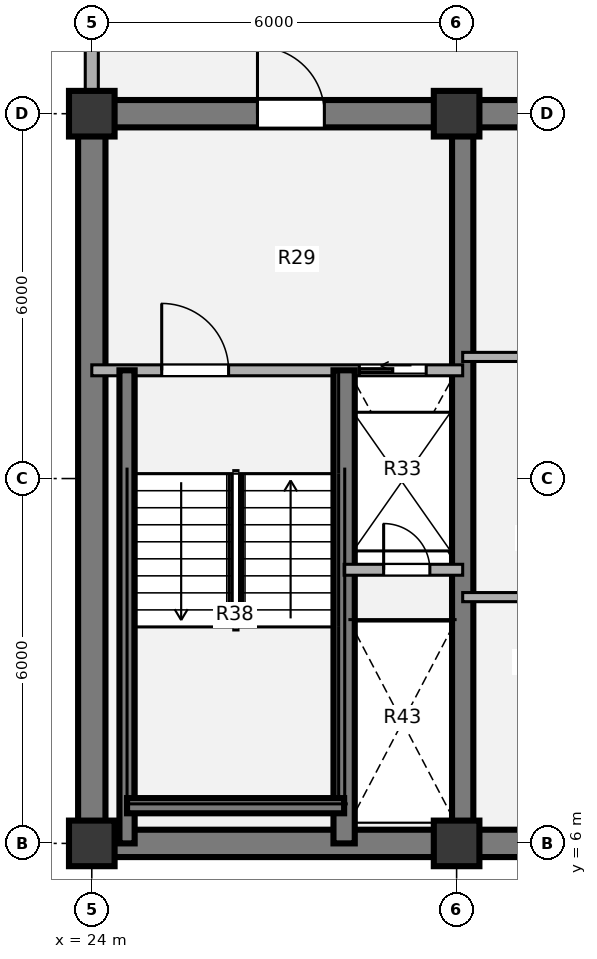
"""IFC4 building model, lengths in metres.
Left out: names, types, materials, properties, quantities, classifications, styles, units other than length and angle.
Written with IfcOpenShell. Run it as: python <this file> out.ifc"""

import sys

from ifc_helpers import new_model, si_unit, direction, frame, frame_2d, origin, origin_2d, place, context, subcontext, project, spatial, rectangle, extrude, source, transform, mapped, element, fill, save


model = new_model("IFC4")
c1 = context("Model", 3, precision=1e-05, world=origin(), true_north=direction((0.0, 1.0)))
c2 = subcontext(c1, "Body", "Model", "MODEL_VIEW")
j1 = project(units=[si_unit("LENGTHUNIT", "METRE"), si_unit("PLANEANGLEUNIT", "RADIAN")], contexts=[c1])
p1 = place(None, origin())
s1 = spatial("IfcSite", under=j1, at=p1, CompositionType="ELEMENT")
p2 = place(p1, origin())
s2 = spatial("IfcBuilding", under=s1, at=p2, CompositionType="ELEMENT")
p3 = place(p2, frame((0.0, 0.0, 163.98)))
s3 = spatial("IfcBuildingStorey", under=s2, at=p3, CompositionType="ELEMENT", Elevation=163.98)
m1 = source(origin(), c2, "Body", "SweptSolid", [
    extrude(rectangle(XDim=0.75, YDim=0.75, at=origin_2d()), origin(), (0.0, 0.0, 1.0), 3.78),
])
for number, where, z_axis, x_axis in (
    (1, (24.0, 6.0, 0.0), (0.0, 0.0, 1.0), (1.0, 0.0, 0.0)),
    (2, (30.0, 6.0, 0.0), (0.0, 0.0, 1.0), (1.0, 0.0, 0.0)),
    (3, (24.0, 18.0, 0.0), (0.0, 0.0, 1.0), (1.0, 0.0, 0.0)),
    (4, (30.0, 18.0, 0.0), (0.0, 0.0, 1.0), (1.0, 0.0, 0.0)),
):
    element("IfcColumn", number, at=place(p3, frame(where, z_axis=z_axis, x_axis=x_axis)), inside=s3, PredefinedType="COLUMN", context=c2, shape_type="MappedRepresentation", body=[
        mapped(m1, transform((0.0, 0.0, 0.0), x_axis=(1.0, 0.0, 0.0), y_axis=(0.0, 1.0, 0.0), z_axis=(0.0, 0.0, 1.0), scale=1.0)),
    ])
p4 = place(p3, frame((48.225, 6.0, 0.0), z_axis=(0.0, 0.0, 1.0), x_axis=(-1.0, 0.0, 0.0)))
e5 = element("IfcWall", 5, at=p4, inside=s3, PredefinedType="SHEAR", context=c2, shape_type="SweptSolid", body=[
    extrude(rectangle(XDim=24.45, YDim=0.45, at=frame_2d((12.225, 0.0))), origin(), (0.0, 0.0, 1.0), 3.78),
])
p5 = place(p3, frame((24.0, 6.0, 0.0), z_axis=(0.0, 0.0, 1.0), x_axis=(0.0, 1.0, 0.0)))
e6 = element("IfcWall", 6, at=p5, inside=s3, PredefinedType="SHEAR", context=c2, shape_type="SweptSolid", body=[
    extrude(rectangle(XDim=12.0, YDim=0.45, at=frame_2d((6.0, 0.0))), origin(), (0.0, 0.0, 1.0), 3.78),
])
p6 = place(p3, frame((23.775, 18.0, 0.0), z_axis=(0.0, 0.0, 1.0), x_axis=(1.0, 0.0, 0.0)))
e7 = element("IfcWall", 7, at=p6, inside=s3, PredefinedType="SHEAR", context=c2, shape_type="SweptSolid", body=[
    extrude(rectangle(XDim=9.425, YDim=0.45, at=frame_2d((4.712, 0.0))), origin(), (0.0, 0.0, 1.0), 3.78),
])
p7 = place(p6, frame((2.95, 0.0, 0.0)))
e8 = element("IfcOpeningElement", 8, at=p7, cuts=e7, PredefinedType="OPENING", context=c2, shape_type="SweptSolid", body=[
    extrude(rectangle(XDim=1.1, YDim=2.1, at=origin_2d()), frame((0.55, 0.235, 1.05), z_axis=(0.0, -1.0, 0.0), x_axis=(1.0, 0.0, 0.0)), (0.0, 0.0, 1.0), 0.47),
])
p8 = place(p3, frame((30.1, 6.0, 0.0), z_axis=(0.0, 0.0, 1.0), x_axis=(0.0, 1.0, 0.0)))
e9 = element("IfcWall", 9, at=p8, inside=s3, PredefinedType="SHEAR", context=c2, shape_type="SweptSolid", body=[
    extrude(rectangle(XDim=12.0, YDim=0.35, at=frame_2d((6.0, 0.0))), origin(), (0.0, 0.0, 1.0), 3.78),
])
p9 = place(p3, frame((24.0, 18.355, 0.0), z_axis=(0.0, 0.0, 1.0), x_axis=(0.0, 1.0, 0.0)))
e10 = element("IfcWall", 10, at=p9, inside=s3, PredefinedType="SOLIDWALL", context=c2, shape_type="SweptSolid", body=[
    extrude(rectangle(XDim=2.695, YDim=0.215, at=frame_2d((1.348, 0.0))), origin(), (0.0, 0.0, 1.0), 2.718),
])
for number, where, z_axis, x_axis in (
    (11, (30.1, 14.0, 0.0), (0.0, 0.0, 1.0), (1.0, 0.0, 0.0)),
    (12, (30.1, 10.05, 0.0), (0.0, 0.0, 1.0), (1.0, 0.0, 0.0)),
):
    element("IfcWall", number, at=place(p3, frame(where, z_axis=z_axis, x_axis=x_axis)), inside=s3, PredefinedType="PARTITIONING", context=c2, shape_type="SweptSolid", body=[
        extrude(rectangle(XDim=2.5, YDim=0.15, at=frame_2d((1.25, 0.0))), origin(), (0.0, 0.0, 1.0), 3.5),
    ])
p10 = place(p3, frame((24.0, 13.78, 0.0), z_axis=(0.0, 0.0, 1.0), x_axis=(1.0, 0.0, 0.0)))
e13 = element("IfcWall", 13, at=p10, inside=s3, PredefinedType="PARTITIONING", context=c2, shape_type="SweptSolid", body=[
    extrude(rectangle(XDim=6.1, YDim=0.18, at=frame_2d((3.05, 0.0))), origin(), (0.0, 0.0, 1.0), 3.5),
])
p11 = place(p10, frame((1.15, 0.0, 0.0)))
e14 = element("IfcOpeningElement", 14, at=p11, cuts=e13, PredefinedType="OPENING", context=c2, shape_type="SweptSolid", body=[
    extrude(rectangle(XDim=1.1, YDim=2.1, at=origin_2d()), frame((0.55, 0.1, 1.05), z_axis=(0.0, -1.0, 0.0), x_axis=(1.0, 0.0, 0.0)), (0.0, 0.0, 1.0), 0.2),
])
p12 = place(p10, frame((4.4, 0.0, 0.0)))
e15 = element("IfcOpeningElement", 15, at=p12, cuts=e13, PredefinedType="OPENING", context=c2, shape_type="SweptSolid", body=[
    extrude(rectangle(XDim=1.1, YDim=2.1, at=origin_2d()), frame((0.55, 0.1, 1.05), z_axis=(0.0, -1.0, 0.0), x_axis=(1.0, 0.0, 0.0)), (0.0, 0.0, 1.0), 0.2),
])
p13 = place(p3, frame((28.15, 6.0, 0.0), z_axis=(0.0, 0.0, 1.0), x_axis=(0.0, 1.0, 0.0)))
e16 = element("IfcWall", 16, at=p13, inside=s3, PredefinedType="SHEAR", context=c2, shape_type="SweptSolid", body=[
    extrude(rectangle(XDim=7.78, YDim=0.35, at=frame_2d((3.89, 0.0))), origin(), (0.0, 0.0, 1.0), 3.85),
])
p14 = place(p3, frame((24.58, 6.0, 0.0), z_axis=(0.0, 0.0, 1.0), x_axis=(0.0, 1.0, 0.0)))
e17 = element("IfcWall", 17, at=p14, inside=s3, PredefinedType="SHEAR", context=c2, shape_type="SweptSolid", body=[
    extrude(rectangle(XDim=7.78, YDim=0.25, at=frame_2d((3.89, 0.0))), origin(), (0.0, 0.0, 1.0), 3.85),
])
p15 = place(p3, frame((24.58, 6.62, 0.0), z_axis=(0.0, 0.0, 1.0), x_axis=(1.0, 0.0, 0.0)))
e18 = element("IfcWall", 18, at=p15, inside=s3, PredefinedType="SHEAR", context=c2, shape_type="SweptSolid", body=[
    extrude(rectangle(XDim=3.57, YDim=0.25, at=frame_2d((1.785, 0.0))), origin(), (0.0, 0.0, 1.0), 3.85),
])
p16 = place(p3, frame((28.15, 10.5, 0.0), z_axis=(0.0, 0.0, 1.0), x_axis=(1.0, 0.0, 0.0)))
e19 = element("IfcWall", 19, at=p16, inside=s3, PredefinedType="PARTITIONING", context=c2, shape_type="SweptSolid", body=[
    extrude(rectangle(XDim=1.95, YDim=0.18, at=frame_2d((0.975, 0.0))), origin(), (0.0, 0.0, 1.0), 3.5),
])
p17 = place(p16, frame((0.65, 0.0, 0.0)))
e20 = element("IfcOpeningElement", 20, at=p17, cuts=e19, PredefinedType="OPENING", context=c2, shape_type="SweptSolid", body=[
    extrude(rectangle(XDim=0.76, YDim=2.05, at=origin_2d()), frame((0.38, 0.1, 1.025), z_axis=(0.0, -1.0, 0.0), x_axis=(1.0, 0.0, 0.0)), (0.0, 0.0, 1.0), 0.2),
])
m2 = source(origin(), c2, "Body", "SweptSolid", [
    extrude(rectangle(XDim=1.1, YDim=2.1, at=origin_2d()), frame((0.55, 0.025, 1.05), z_axis=(0.0, -1.0, 0.0), x_axis=(1.0, 0.0, 0.0)), (0.0, 0.0, 1.0), 0.05),
])
p18 = place(p11, origin())
e21 = element("IfcDoor", 21, at=p18, inside=s3, OperationType="SINGLE_SWING_LEFT", PredefinedType="DOOR", context=c2, shape_type="MappedRepresentation", body=[
    mapped(m2, transform((0.0, 0.0, 0.0), x_axis=(1.0, 0.0, 0.0), y_axis=(0.0, 1.0, 0.0), z_axis=(0.0, 0.0, 1.0), scale=1.0)),
])
fill(e14, e21)
m3 = source(origin(), c2, "Body", "SweptSolid", [
    extrude(rectangle(XDim=1.1, YDim=2.1, at=origin_2d()), frame((0.55, 0.025, 1.05), z_axis=(0.0, -1.0, 0.0), x_axis=(1.0, 0.0, 0.0)), (0.0, 0.0, 1.0), 0.05),
])
p19 = place(p12, origin())
e22 = element("IfcDoor", 22, at=p19, inside=s3, OperationType="SLIDING_TO_LEFT", PredefinedType="DOOR", context=c2, shape_type="MappedRepresentation", body=[
    mapped(m3, transform((0.0, 0.0, 0.0), x_axis=(1.0, 0.0, 0.0), y_axis=(0.0, 1.0, 0.0), z_axis=(0.0, 0.0, 1.0), scale=1.0)),
])
fill(e15, e22)
m4 = source(origin(), c2, "Body", "SweptSolid", [
    extrude(rectangle(XDim=0.76, YDim=2.05, at=origin_2d()), frame((0.38, 0.025, 1.025), z_axis=(0.0, -1.0, 0.0), x_axis=(1.0, 0.0, 0.0)), (0.0, 0.0, 1.0), 0.05),
])
p20 = place(p17, origin())
e23 = element("IfcDoor", 23, at=p20, inside=s3, OperationType="SINGLE_SWING_LEFT", PredefinedType="DOOR", context=c2, shape_type="MappedRepresentation", body=[
    mapped(m4, transform((0.0, 0.0, 0.0), x_axis=(1.0, 0.0, 0.0), y_axis=(0.0, 1.0, 0.0), z_axis=(0.0, 0.0, 1.0), scale=1.0)),
])
fill(e20, e23)
m5 = source(origin(), c2, "Body", "SweptSolid", [
    extrude(rectangle(XDim=1.1, YDim=2.1, at=origin_2d()), frame((0.55, 0.025, 1.05), z_axis=(0.0, -1.0, 0.0), x_axis=(1.0, 0.0, 0.0)), (0.0, 0.0, 1.0), 0.05),
])
p21 = place(p7, origin())
e24 = element("IfcDoor", 24, at=p21, inside=s3, OperationType="SINGLE_SWING_LEFT", PredefinedType="DOOR", context=c2, shape_type="MappedRepresentation", body=[
    mapped(m5, transform((0.0, 0.0, 0.0), x_axis=(1.0, 0.0, 0.0), y_axis=(0.0, 1.0, 0.0), z_axis=(0.0, 0.0, 1.0), scale=1.0)),
])
fill(e8, e24)
save(model, sys.argv[1])
